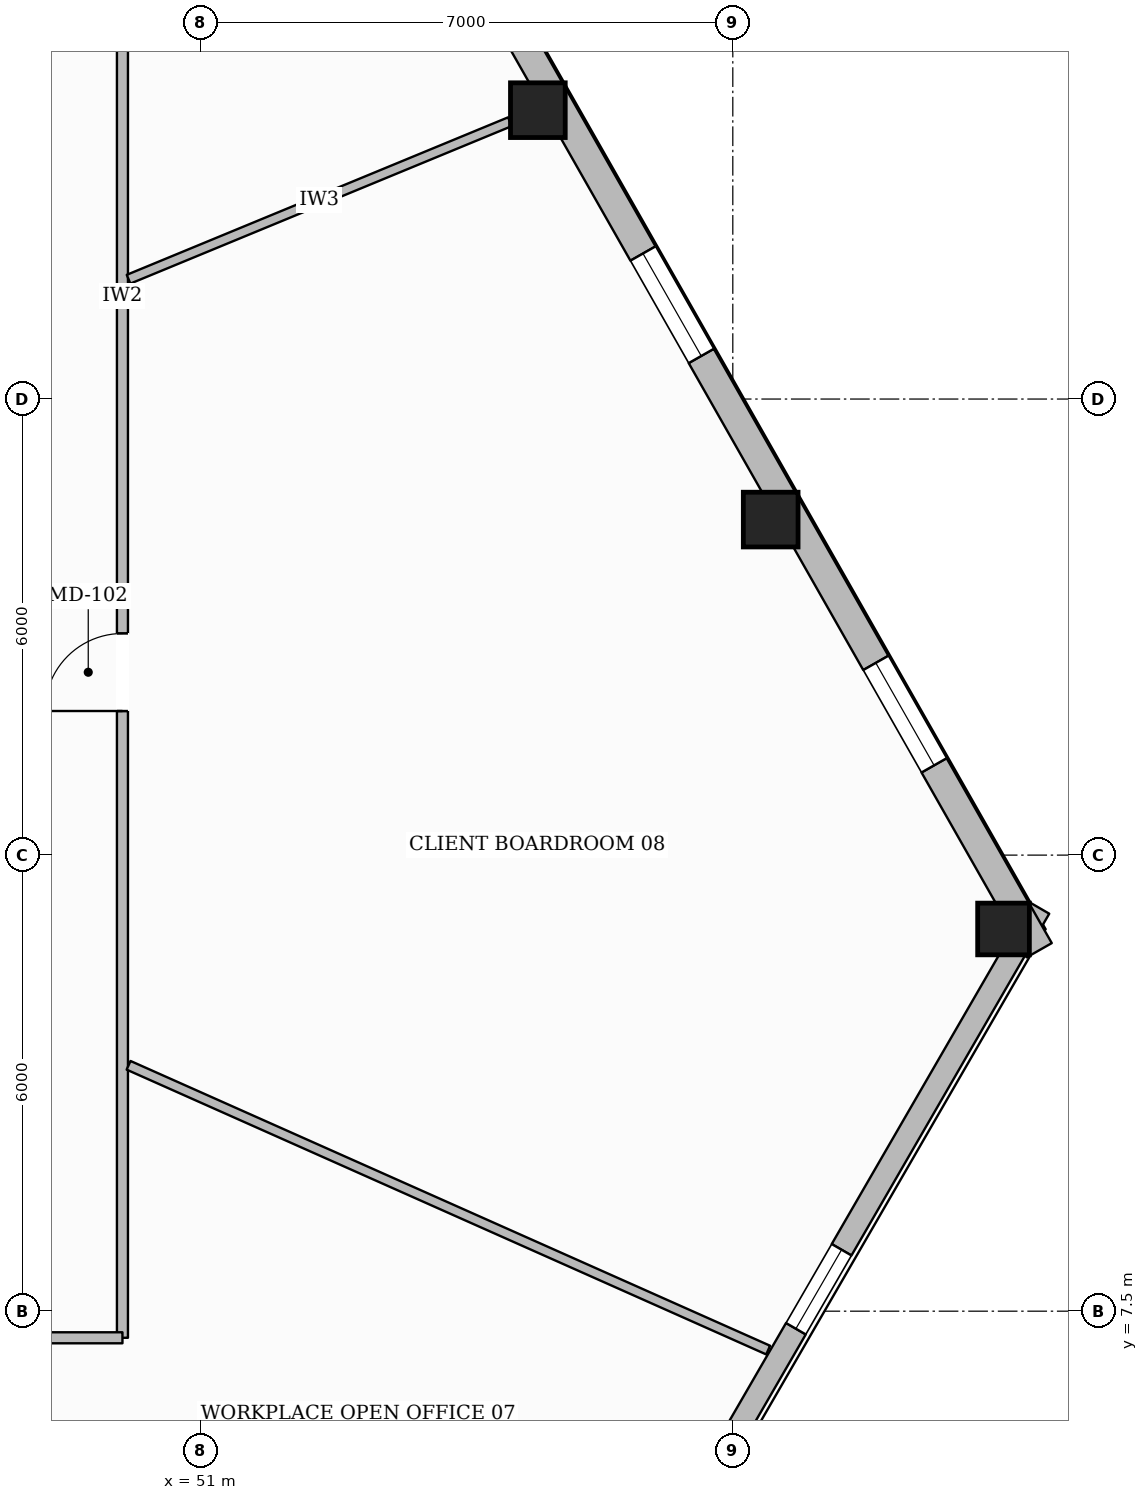
"""IFC4 building model, lengths in metres.
Left out: names, types, materials, properties, quantities, classifications, styles, units other than length and angle.
Written with IfcOpenShell. Run it as: python <this file> out.ifc"""

import sys

from ifc_helpers import new_model, si_unit, direction, frame, frame_2d, origin, origin_2d, place, context, subcontext, project, spatial, rectangle, hollow_rectangle, extrude, element, fill, save


model = new_model("IFC4")
c1 = context("Model", 3, precision=1e-05, world=origin(), true_north=direction((0.0, 1.0)))
c2 = subcontext(c1, "Body", "Model", "MODEL_VIEW")
j1 = project(units=[si_unit("LENGTHUNIT", "METRE"), si_unit("PLANEANGLEUNIT", "RADIAN")], contexts=[c1])
p1 = place(None, origin())
s1 = spatial("IfcSite", under=j1, at=p1, CompositionType="ELEMENT")
p2 = place(p1, origin())
s2 = spatial("IfcBuilding", under=s1, at=p2, CompositionType="ELEMENT")
p3 = place(p2, frame((0.0, 0.0, 150.95)))
s3 = spatial("IfcBuildingStorey", under=s2, at=p3, CompositionType="ELEMENT", Elevation=150.95)
p4 = place(p3, frame((61.562, 12.528, 0.0), z_axis=(0.0, 0.0, 1.0), x_axis=(1.0, 0.0, 0.0)))
e1 = element("IfcColumn", 1, at=p4, inside=s3, PredefinedType="COLUMN", context=c2, shape_type="SweptSolid", body=[
    extrude(hollow_rectangle(XDim=0.68, YDim=0.68, WallThickness=0.03, at=origin_2d()), origin(), (0.0, 0.0, 1.0), 3.43),
])
for number, where, z_axis, x_axis in (
    (2, (58.498, 17.914, 0.0), (0.0, 0.0, 1.0), (1.0, 0.0, 0.0)),
    (3, (55.435, 23.3, 0.0), (0.0, 0.0, 1.0), (1.0, 0.0, 0.0)),
):
    element("IfcColumn", number, at=place(p3, frame(where, z_axis=z_axis, x_axis=x_axis)), inside=s3, PredefinedType="COLUMN", context=c2, shape_type="SweptSolid", body=[
        extrude(hollow_rectangle(XDim=0.72, YDim=0.72, WallThickness=0.032, at=origin_2d()), origin(), (0.0, 0.0, 1.0), 3.43),
    ])
p5 = place(p3, frame((62.033, 12.804, 0.0), z_axis=(0.0, 0.0, 1.0), x_axis=(-0.500904242639, -0.865502709243, 0.0)))
e4 = element("IfcWall", 4, at=p5, inside=s3, PredefinedType="STANDARD", context=c2, shape_type="SweptSolid", body=[
    extrude(rectangle(XDim=11.59, YDim=0.3, at=frame_2d((5.795, 0.0))), origin(), (0.0, 0.0, 1.0), 2.889),
])
p6 = place(p5, frame((5.195, 0.0, 0.65)))
e5 = element("IfcOpeningElement", 5, at=p6, cuts=e4, PredefinedType="OPENING", context=c2, shape_type="SweptSolid", body=[
    extrude(rectangle(XDim=1.2, YDim=1.55, at=frame_2d((0.6, 0.775))), frame((0.0, 0.16, 0.0), z_axis=(0.0, -1.0, 0.0), x_axis=(1.0, 0.0, 0.0)), (0.0, 0.0, 1.0), 0.32),
])
p7 = place(p3, frame((43.179, 45.396, 0.0), z_axis=(0.0, 0.0, 1.0), x_axis=(0.494363218784, -0.869255433065, 0.0)))
e6 = element("IfcWall", 6, at=p7, inside=s3, PredefinedType="STANDARD", context=c2, shape_type="SweptSolid", body=[
    extrude(rectangle(XDim=38.134, YDim=0.38, at=frame_2d((19.067, 0.0))), origin(), (0.0, 0.0, 1.0), 2.889),
])
p8 = place(p7, frame((9.134, 0.0, 0.0)))
e7 = element("IfcOpeningElement", 7, at=p8, cuts=e6, PredefinedType="OPENING", context=c2, shape_type="SweptSolid", body=[
    extrude(rectangle(XDim=1.0, YDim=2.2, at=frame_2d((0.5, 1.1))), frame((0.0, 0.2, 0.0), z_axis=(0.0, -1.0, 0.0), x_axis=(1.0, 0.0, 0.0)), (0.0, 0.0, 1.0), 0.4),
])
p9 = place(p7, frame((33.785, 0.0, 0.55)))
e8 = element("IfcOpeningElement", 8, at=p9, cuts=e6, PredefinedType="OPENING", context=c2, shape_type="SweptSolid", body=[
    extrude(rectangle(XDim=1.55, YDim=1.6, at=frame_2d((0.775, 0.8))), frame((0.0, 0.2, 0.0), z_axis=(0.0, -1.0, 0.0), x_axis=(1.0, 0.0, 0.0)), (0.0, 0.0, 1.0), 0.4),
])
p10 = place(p7, frame((27.589, 0.0, 0.55)))
e9 = element("IfcOpeningElement", 9, at=p10, cuts=e6, PredefinedType="OPENING", context=c2, shape_type="SweptSolid", body=[
    extrude(rectangle(XDim=1.55, YDim=1.6, at=frame_2d((0.775, 0.8))), frame((0.0, 0.2, 0.0), z_axis=(0.0, -1.0, 0.0), x_axis=(1.0, 0.0, 0.0)), (0.0, 0.0, 1.0), 0.4),
])
p11 = place(p7, frame((21.393, 0.0, 0.55)))
e10 = element("IfcOpeningElement", 10, at=p11, cuts=e6, PredefinedType="OPENING", context=c2, shape_type="SweptSolid", body=[
    extrude(rectangle(XDim=1.55, YDim=1.6, at=frame_2d((0.775, 0.8))), frame((0.0, 0.2, 0.0), z_axis=(0.0, -1.0, 0.0), x_axis=(1.0, 0.0, 0.0)), (0.0, 0.0, 1.0), 0.4),
])
p12 = place(p7, frame((2.805, 0.0, 0.55)))
e11 = element("IfcOpeningElement", 11, at=p12, cuts=e6, PredefinedType="OPENING", context=c2, shape_type="SweptSolid", body=[
    extrude(rectangle(XDim=1.55, YDim=1.6, at=frame_2d((0.775, 0.8))), frame((0.0, 0.2, 0.0), z_axis=(0.0, -1.0, 0.0), x_axis=(1.0, 0.0, 0.0)), (0.0, 0.0, 1.0), 0.4),
])
p13 = place(p3, frame((49.97, 7.15, 0.0), z_axis=(0.0, 0.0, 1.0), x_axis=(0.0, 1.0, 0.0)))
e12 = element("IfcWall", 12, at=p13, inside=s3, PredefinedType="PARTITIONING", context=c2, shape_type="SweptSolid", body=[
    extrude(rectangle(XDim=17.9, YDim=0.145, at=frame_2d((8.95, 0.0))), origin(), (0.0, 0.0, 1.0), 3.118),
])
p14 = place(p13, frame((8.246, 0.0, 0.0)))
e13 = element("IfcOpeningElement", 13, at=p14, cuts=e12, PredefinedType="OPENING", context=c2, shape_type="SweptSolid", body=[
    extrude(rectangle(XDim=1.02, YDim=2.15, at=frame_2d((0.51, 1.075))), frame((0.0, 0.083, 0.0), z_axis=(0.0, -1.0, 0.0), x_axis=(1.0, 0.0, 0.0)), (0.0, 0.0, 1.0), 0.165),
])
p15 = place(p3, frame((26.03, 7.15, 0.0), z_axis=(0.0, 0.0, 1.0), x_axis=(1.0, 0.0, 0.0)))
e14 = element("IfcWall", 14, at=p15, inside=s3, PredefinedType="PARTITIONING", context=c2, shape_type="SweptSolid", body=[
    extrude(rectangle(XDim=23.94, YDim=0.145, at=frame_2d((11.97, 0.0))), origin(), (0.0, 0.0, 1.0), 3.43),
])
p16 = place(p15, frame((4.53, 0.0, 0.0)))
e15 = element("IfcOpeningElement", 15, at=p16, cuts=e14, PredefinedType="OPENING", context=c2, shape_type="SweptSolid", body=[
    extrude(rectangle(XDim=0.88, YDim=2.1, at=frame_2d((0.44, 1.05))), frame((0.0, 0.083, 0.0), z_axis=(0.0, -1.0, 0.0), x_axis=(1.0, 0.0, 0.0)), (0.0, 0.0, 1.0), 0.165),
])
p17 = place(p15, frame((7.05, 0.0, 0.0)))
e16 = element("IfcOpeningElement", 16, at=p17, cuts=e14, PredefinedType="OPENING", context=c2, shape_type="SweptSolid", body=[
    extrude(rectangle(XDim=0.88, YDim=2.1, at=frame_2d((0.44, 1.05))), frame((0.0, 0.083, 0.0), z_axis=(0.0, -1.0, 0.0), x_axis=(1.0, 0.0, 0.0)), (0.0, 0.0, 1.0), 0.165),
])
p18 = place(p15, frame((9.43, 0.0, 0.0)))
e17 = element("IfcOpeningElement", 17, at=p18, cuts=e14, PredefinedType="OPENING", context=c2, shape_type="SweptSolid", body=[
    extrude(rectangle(XDim=0.96, YDim=2.1, at=frame_2d((0.48, 1.05))), frame((0.0, 0.083, 0.0), z_axis=(0.0, -1.0, 0.0), x_axis=(1.0, 0.0, 0.0)), (0.0, 0.0, 1.0), 0.165),
])
p19 = place(p15, frame((13.062, 0.0, 0.0)))
e18 = element("IfcOpeningElement", 18, at=p19, cuts=e14, PredefinedType="OPENING", context=c2, shape_type="SweptSolid", body=[
    extrude(rectangle(XDim=0.98, YDim=2.15, at=frame_2d((0.49, 1.075))), frame((0.0, 0.083, 0.0), z_axis=(0.0, -1.0, 0.0), x_axis=(1.0, 0.0, 0.0)), (0.0, 0.0, 1.0), 0.165),
])
p20 = place(p15, frame((19.41, 0.0, 0.0)))
e19 = element("IfcOpeningElement", 19, at=p20, cuts=e14, PredefinedType="OPENING", context=c2, shape_type="SweptSolid", body=[
    extrude(rectangle(XDim=1.4, YDim=2.2, at=frame_2d((0.7, 1.1))), frame((0.0, 0.083, 0.0), z_axis=(0.0, -1.0, 0.0), x_axis=(1.0, 0.0, 0.0)), (0.0, 0.0, 1.0), 0.165),
])
p21 = place(p3, frame((50.051, 21.076, 0.0), z_axis=(0.0, 0.0, 1.0), x_axis=(0.924287300844, 0.38169750523, 0.0)))
e20 = element("IfcWall", 20, at=p21, inside=s3, PredefinedType="PARTITIONING", context=c2, shape_type="SweptSolid", body=[
    extrude(rectangle(XDim=5.428, YDim=0.125, at=frame_2d((2.714, 0.0))), origin(), (0.0, 0.0, 1.0), 3.43),
])
p22 = place(p3, frame((50.051, 10.735, 0.0), z_axis=(0.0, 0.0, 1.0), x_axis=(0.913538089358, -0.406753192111, 0.0)))
e21 = element("IfcWall", 21, at=p22, inside=s3, PredefinedType="PARTITIONING", context=c2, shape_type="SweptSolid", body=[
    extrude(rectangle(XDim=9.211, YDim=0.125, at=frame_2d((4.605, 0.0))), origin(), (0.0, 0.0, 1.0), 3.43),
])
p23 = place(p9, origin())
e22 = element("IfcWindow", 22, at=p23, inside=s3, PartitioningType="SINGLE_PANEL", PredefinedType="WINDOW", context=c2, shape_type="SweptSolid", body=[
    extrude(rectangle(XDim=1.55, YDim=1.6, at=frame_2d((0.775, 0.8))), frame((0.0, 0.03, 0.0), z_axis=(0.0, -1.0, 0.0), x_axis=(1.0, 0.0, 0.0)), (0.0, 0.0, 1.0), 0.06),
])
fill(e8, e22)
p24 = place(p10, origin())
e23 = element("IfcWindow", 23, at=p24, inside=s3, PartitioningType="SINGLE_PANEL", PredefinedType="WINDOW", context=c2, shape_type="SweptSolid", body=[
    extrude(rectangle(XDim=1.55, YDim=1.6, at=frame_2d((0.775, 0.8))), frame((0.0, 0.03, 0.0), z_axis=(0.0, -1.0, 0.0), x_axis=(1.0, 0.0, 0.0)), (0.0, 0.0, 1.0), 0.06),
])
fill(e9, e23)
p25 = place(p6, origin())
e24 = element("IfcWindow", 24, at=p25, inside=s3, PartitioningType="SINGLE_PANEL", PredefinedType="WINDOW", context=c2, shape_type="SweptSolid", body=[
    extrude(rectangle(XDim=1.2, YDim=1.55, at=frame_2d((0.6, 0.775))), frame((0.0, 0.03, 0.0), z_axis=(0.0, -1.0, 0.0), x_axis=(1.0, 0.0, 0.0)), (0.0, 0.0, 1.0), 0.06),
])
fill(e5, e24)
p26 = place(p14, origin())
e25 = element("IfcDoor", 25, at=p26, inside=s3, OperationType="SINGLE_SWING_LEFT", PredefinedType="DOOR", context=c2, shape_type="SweptSolid", body=[
    extrude(rectangle(XDim=1.02, YDim=2.15, at=frame_2d((0.51, 1.075))), frame((0.0, 0.025, 0.0), z_axis=(0.0, -1.0, 0.0), x_axis=(1.0, 0.0, 0.0)), (0.0, 0.0, 1.0), 0.05),
])
fill(e13, e25)
save(model, sys.argv[1])
